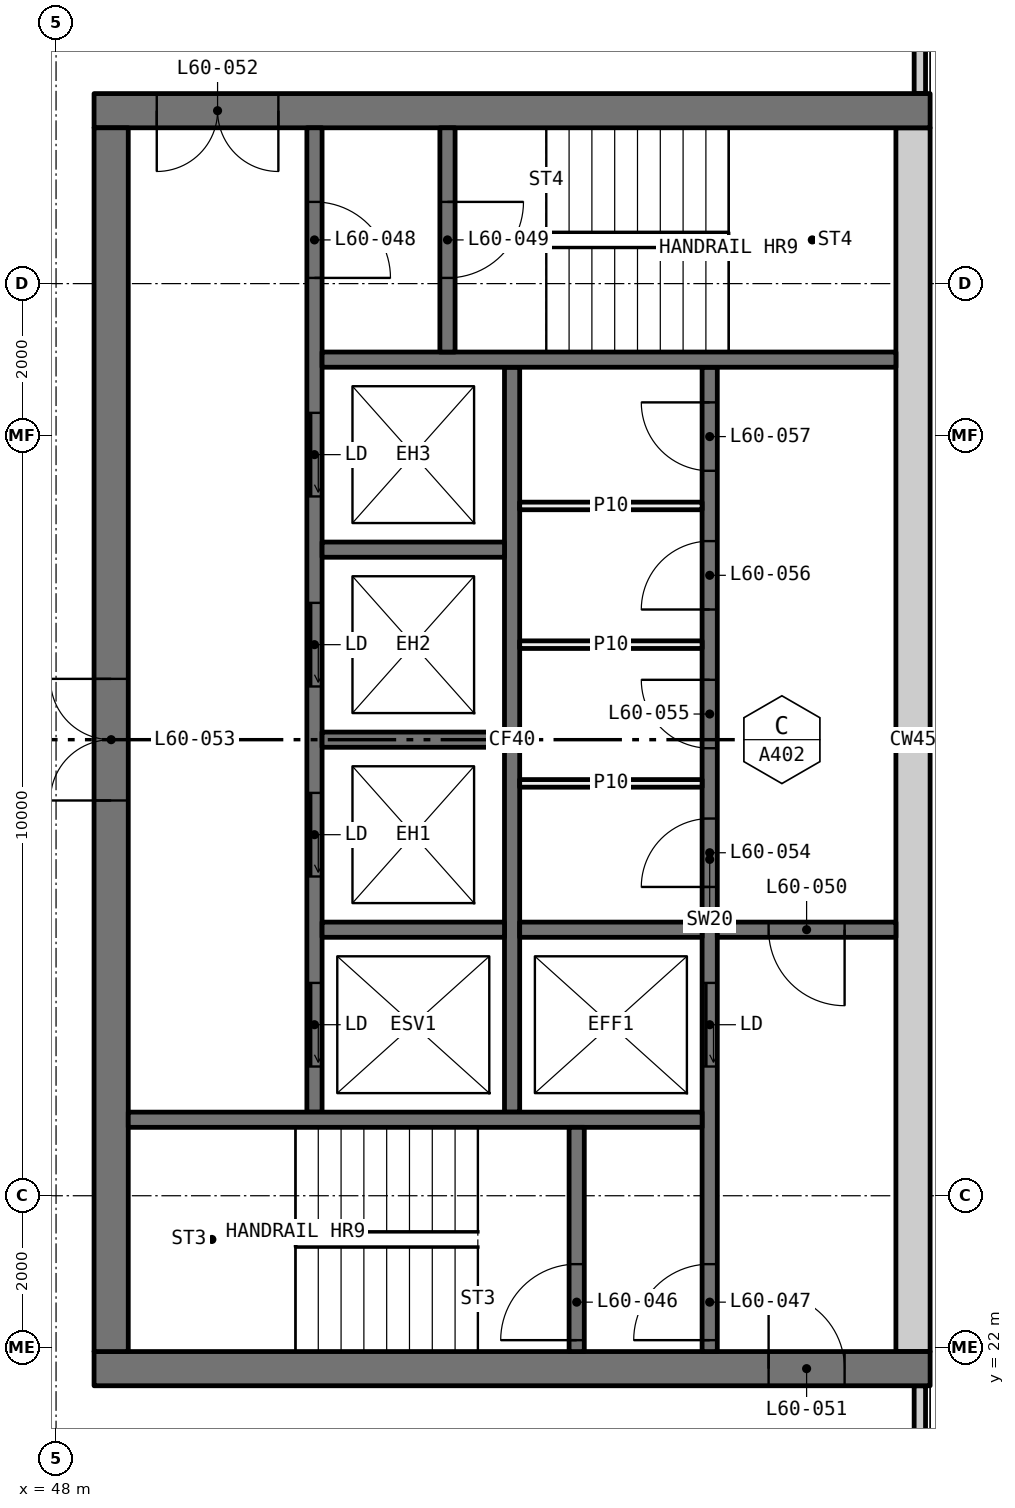
"""IFC4 building model, lengths in metres.
Left out: names, types, materials, properties, quantities, classifications, styles, units other than length and angle.
Written with IfcOpenShell. Run it as: python <this file> out.ifc"""

import sys

from ifc_helpers import new_model, si_unit, direction, frame, frame_2d, origin, place, context, subcontext, project, spatial, rectangle, extrude, element, fill, save


model = new_model("IFC4")
c1 = context("Model", 3, precision=1e-05, world=origin(), true_north=direction((0.0, 1.0)))
c2 = subcontext(c1, "Body", "Model", "MODEL_VIEW")
j1 = project(units=[si_unit("LENGTHUNIT", "METRE"), si_unit("PLANEANGLEUNIT", "RADIAN")], contexts=[c1])
p1 = place(None, origin())
s1 = spatial("IfcSite", under=j1, at=p1, CompositionType="ELEMENT")
p2 = place(p1, origin())
s2 = spatial("IfcBuilding", under=s1, at=p2, CompositionType="ELEMENT")
p3 = place(p2, frame((0.0, 0.0, 224.85)))
s3 = spatial("IfcBuildingStorey", under=s2, at=p3, CompositionType="ELEMENT", Elevation=224.85)
for number, where, z_axis, x_axis in (
    (1, (59.365, 18.71, 0.0), (0.0, 0.0, 1.0), (0.0, 1.0, 0.0)),
    (2, (59.365, 38.5, 0.0), (0.0, 0.0, 1.0), (0.0, 1.0, 0.0)),
):
    element("IfcWall", number, at=place(p3, frame(where, z_axis=z_axis, x_axis=x_axis)), inside=s3, PredefinedType="ELEMENTEDWALL", context=c2, shape_type="SweptSolid", body=[
        extrude(rectangle(XDim=2.79, YDim=0.15, at=frame_2d((1.395, 0.0))), origin(), (0.0, 0.0, 1.0), 3.05),
    ])
p4 = place(p3, frame((59.5, 21.725, 0.0), z_axis=(0.0, 0.0, 1.0), x_axis=(-1.0, 0.0, 0.0)))
e3 = element("IfcWall", 3, at=p4, inside=s3, PredefinedType="SHEAR", context=c2, shape_type="SweptSolid", body=[
    extrude(rectangle(XDim=11.0, YDim=0.45, at=frame_2d((5.5, 0.0))), origin(), (0.0, 0.0, 1.0), 3.05),
])
p5 = place(p4, frame((1.125, 0.0, 0.0)))
e4 = element("IfcOpeningElement", 4, at=p5, cuts=e3, PredefinedType="OPENING", context=c2, shape_type="SweptSolid", body=[
    extrude(rectangle(XDim=1.0, YDim=2.1, at=frame_2d((0.5, 1.05))), frame((0.0, 0.235, 0.0), z_axis=(0.0, -1.0, 0.0), x_axis=(1.0, 0.0, 0.0)), (0.0, 0.0, 1.0), 0.47),
])
p6 = place(p3, frame((59.5, 38.275, 0.0), z_axis=(0.0, 0.0, 1.0), x_axis=(-1.0, 0.0, 0.0)))
e5 = element("IfcWall", 5, at=p6, inside=s3, PredefinedType="SHEAR", context=c2, shape_type="SweptSolid", body=[
    extrude(rectangle(XDim=11.0, YDim=0.45, at=frame_2d((5.5, 0.0))), origin(), (0.0, 0.0, 1.0), 3.05),
])
p7 = place(p6, frame((8.575, 0.0, 0.0)))
e6 = element("IfcOpeningElement", 6, at=p7, cuts=e5, PredefinedType="OPENING", context=c2, shape_type="SweptSolid", body=[
    extrude(rectangle(XDim=1.6, YDim=2.1, at=frame_2d((0.8, 1.05))), frame((0.0, 0.235, 0.0), z_axis=(0.0, -1.0, 0.0), x_axis=(1.0, 0.0, 0.0)), (0.0, 0.0, 1.0), 0.47),
])
p8 = place(p3, frame((59.275, 21.95, 0.0), z_axis=(0.0, 0.0, 1.0), x_axis=(0.0, 1.0, 0.0)))
e7 = element("IfcWall", 7, at=p8, inside=s3, PredefinedType="SHEAR", context=c2, shape_type="SweptSolid", body=[
    extrude(rectangle(XDim=16.1, YDim=0.45, at=frame_2d((8.05, 0.0))), origin(), (0.0, 0.0, 1.0), 3.05),
])
p9 = place(p3, frame((48.725, 21.95, 0.0), z_axis=(0.0, 0.0, 1.0), x_axis=(0.0, 1.0, 0.0)))
e8 = element("IfcWall", 8, at=p9, inside=s3, PredefinedType="SHEAR", context=c2, shape_type="SweptSolid", body=[
    extrude(rectangle(XDim=16.1, YDim=0.45, at=frame_2d((8.05, 0.0))), origin(), (0.0, 0.0, 1.0), 3.05),
])
p10 = place(p9, frame((7.25, 0.0, 0.0)))
e9 = element("IfcOpeningElement", 9, at=p10, cuts=e8, PredefinedType="OPENING", context=c2, shape_type="SweptSolid", body=[
    extrude(rectangle(XDim=1.6, YDim=2.1, at=frame_2d((0.8, 1.05))), frame((0.0, 0.235, 0.0), z_axis=(0.0, -1.0, 0.0), x_axis=(1.0, 0.0, 0.0)), (0.0, 0.0, 1.0), 0.47),
])
p11 = place(p3, frame((56.6, 21.95, 0.0), z_axis=(0.0, 0.0, 1.0), x_axis=(0.0, 1.0, 0.0)))
e10 = element("IfcWall", 10, at=p11, inside=s3, PredefinedType="SOLIDWALL", context=c2, shape_type="SweptSolid", body=[
    extrude(rectangle(XDim=12.95, YDim=0.2, at=frame_2d((6.475, 0.0))), origin(), (0.0, 0.0, 1.0), 3.05),
])
p12 = place(p11, frame((3.75, 0.0, 0.0)))
e11 = element("IfcOpeningElement", 11, at=p12, cuts=e10, PredefinedType="OPENING", context=c2, shape_type="SweptSolid", body=[
    extrude(rectangle(XDim=1.1, YDim=2.1, at=frame_2d((0.55, 1.05))), frame((0.0, 0.11, 0.0), z_axis=(0.0, -1.0, 0.0), x_axis=(1.0, 0.0, 0.0)), (0.0, 0.0, 1.0), 0.22),
])
p13 = place(p11, frame((0.15, 0.0, 0.0)))
e12 = element("IfcOpeningElement", 12, at=p13, cuts=e10, PredefinedType="OPENING", context=c2, shape_type="SweptSolid", body=[
    extrude(rectangle(XDim=1.0, YDim=2.1, at=frame_2d((0.5, 1.05))), frame((0.0, 0.11, 0.0), z_axis=(0.0, -1.0, 0.0), x_axis=(1.0, 0.0, 0.0)), (0.0, 0.0, 1.0), 0.22),
])
p14 = place(p11, frame((6.113, 0.0, 0.0)))
e13 = element("IfcOpeningElement", 13, at=p14, cuts=e10, PredefinedType="OPENING", context=c2, shape_type="SweptSolid", body=[
    extrude(rectangle(XDim=0.9, YDim=2.1, at=frame_2d((0.45, 1.05))), frame((0.0, 0.11, 0.0), z_axis=(0.0, -1.0, 0.0), x_axis=(1.0, 0.0, 0.0)), (0.0, 0.0, 1.0), 0.22),
])
p15 = place(p11, frame((7.938, 0.0, 0.0)))
e14 = element("IfcOpeningElement", 14, at=p15, cuts=e10, PredefinedType="OPENING", context=c2, shape_type="SweptSolid", body=[
    extrude(rectangle(XDim=0.9, YDim=2.1, at=frame_2d((0.45, 1.05))), frame((0.0, 0.11, 0.0), z_axis=(0.0, -1.0, 0.0), x_axis=(1.0, 0.0, 0.0)), (0.0, 0.0, 1.0), 0.22),
])
p16 = place(p11, frame((9.762, 0.0, 0.0)))
e15 = element("IfcOpeningElement", 15, at=p16, cuts=e10, PredefinedType="OPENING", context=c2, shape_type="SweptSolid", body=[
    extrude(rectangle(XDim=0.9, YDim=2.1, at=frame_2d((0.45, 1.05))), frame((0.0, 0.11, 0.0), z_axis=(0.0, -1.0, 0.0), x_axis=(1.0, 0.0, 0.0)), (0.0, 0.0, 1.0), 0.22),
])
p17 = place(p11, frame((11.587, 0.0, 0.0)))
e16 = element("IfcOpeningElement", 16, at=p17, cuts=e10, PredefinedType="OPENING", context=c2, shape_type="SweptSolid", body=[
    extrude(rectangle(XDim=0.9, YDim=2.1, at=frame_2d((0.45, 1.05))), frame((0.0, 0.11, 0.0), z_axis=(0.0, -1.0, 0.0), x_axis=(1.0, 0.0, 0.0)), (0.0, 0.0, 1.0), 0.22),
])
p18 = place(p3, frame((51.4, 25.1, 0.0), z_axis=(0.0, 0.0, 1.0), x_axis=(0.0, 1.0, 0.0)))
e17 = element("IfcWall", 17, at=p18, inside=s3, PredefinedType="SOLIDWALL", context=c2, shape_type="SweptSolid", body=[
    extrude(rectangle(XDim=12.95, YDim=0.2, at=frame_2d((6.475, 0.0))), origin(), (0.0, 0.0, 1.0), 3.05),
])
p19 = place(p18, frame((0.6, 0.0, 0.0)))
e18 = element("IfcOpeningElement", 18, at=p19, cuts=e17, PredefinedType="OPENING", context=c2, shape_type="SweptSolid", body=[
    extrude(rectangle(XDim=1.1, YDim=2.1, at=frame_2d((0.55, 1.05))), frame((0.0, 0.11, 0.0), z_axis=(0.0, -1.0, 0.0), x_axis=(1.0, 0.0, 0.0)), (0.0, 0.0, 1.0), 0.22),
])
p20 = place(p18, frame((3.1, 0.0, 0.0)))
e19 = element("IfcOpeningElement", 19, at=p20, cuts=e17, PredefinedType="OPENING", context=c2, shape_type="SweptSolid", body=[
    extrude(rectangle(XDim=1.1, YDim=2.1, at=frame_2d((0.55, 1.05))), frame((0.0, 0.11, 0.0), z_axis=(0.0, -1.0, 0.0), x_axis=(1.0, 0.0, 0.0)), (0.0, 0.0, 1.0), 0.22),
])
p21 = place(p18, frame((5.6, 0.0, 0.0)))
e20 = element("IfcOpeningElement", 20, at=p21, cuts=e17, PredefinedType="OPENING", context=c2, shape_type="SweptSolid", body=[
    extrude(rectangle(XDim=1.1, YDim=2.1, at=frame_2d((0.55, 1.05))), frame((0.0, 0.11, 0.0), z_axis=(0.0, -1.0, 0.0), x_axis=(1.0, 0.0, 0.0)), (0.0, 0.0, 1.0), 0.22),
])
p22 = place(p18, frame((8.1, 0.0, 0.0)))
e21 = element("IfcOpeningElement", 21, at=p22, cuts=e17, PredefinedType="OPENING", context=c2, shape_type="SweptSolid", body=[
    extrude(rectangle(XDim=1.1, YDim=2.1, at=frame_2d((0.55, 1.05))), frame((0.0, 0.11, 0.0), z_axis=(0.0, -1.0, 0.0), x_axis=(1.0, 0.0, 0.0)), (0.0, 0.0, 1.0), 0.22),
])
p23 = place(p18, frame((10.975, 0.0, 0.0)))
e22 = element("IfcOpeningElement", 22, at=p23, cuts=e17, PredefinedType="OPENING", context=c2, shape_type="SweptSolid", body=[
    extrude(rectangle(XDim=1.0, YDim=2.1, at=frame_2d((0.5, 1.05))), frame((0.0, 0.11, 0.0), z_axis=(0.0, -1.0, 0.0), x_axis=(1.0, 0.0, 0.0)), (0.0, 0.0, 1.0), 0.22),
])
p24 = place(p3, frame((54.0, 25.1, 0.0), z_axis=(0.0, 0.0, 1.0), x_axis=(0.0, 1.0, 0.0)))
e23 = element("IfcWall", 23, at=p24, inside=s3, PredefinedType="SOLIDWALL", context=c2, shape_type="SweptSolid", body=[
    extrude(rectangle(XDim=9.8, YDim=0.2, at=frame_2d((4.9, 0.0))), origin(), (0.0, 0.0, 1.0), 3.05),
])
for number, where, z_axis, x_axis in (
    (24, (56.5, 25.0, 0.0), (0.0, 0.0, 1.0), (-1.0, 0.0, 0.0)),
    (25, (59.05, 35.0, 0.0), (0.0, 0.0, 1.0), (-1.0, 0.0, 0.0)),
):
    element("IfcWall", number, at=place(p3, frame(where, z_axis=z_axis, x_axis=x_axis)), inside=s3, PredefinedType="SOLIDWALL", context=c2, shape_type="SweptSolid", body=[
        extrude(rectangle(XDim=7.55, YDim=0.2, at=frame_2d((3.775, 0.0))), origin(), (0.0, 0.0, 1.0), 3.05),
    ])
p25 = place(p3, frame((59.05, 27.5, 0.0), z_axis=(0.0, 0.0, 1.0), x_axis=(-1.0, 0.0, 0.0)))
e26 = element("IfcWall", 26, at=p25, inside=s3, PredefinedType="SOLIDWALL", context=c2, shape_type="SweptSolid", body=[
    extrude(rectangle(XDim=2.35, YDim=0.2, at=frame_2d((1.175, 0.0))), origin(), (0.0, 0.0, 1.0), 3.05),
])
p26 = place(p25, frame((0.675, 0.0, 0.0)))
e27 = element("IfcOpeningElement", 27, at=p26, cuts=e26, PredefinedType="OPENING", context=c2, shape_type="SweptSolid", body=[
    extrude(rectangle(XDim=1.0, YDim=2.1, at=frame_2d((0.5, 1.05))), frame((0.0, 0.11, 0.0), z_axis=(0.0, -1.0, 0.0), x_axis=(1.0, 0.0, 0.0)), (0.0, 0.0, 1.0), 0.22),
])
p27 = place(p3, frame((54.85, 21.95, 0.0), z_axis=(0.0, 0.0, 1.0), x_axis=(0.0, 1.0, 0.0)))
e28 = element("IfcWall", 28, at=p27, inside=s3, PredefinedType="SOLIDWALL", context=c2, shape_type="SweptSolid", body=[
    extrude(rectangle(XDim=2.95, YDim=0.2, at=frame_2d((1.475, 0.0))), origin(), (0.0, 0.0, 1.0), 3.05),
])
p28 = place(p27, frame((0.15, 0.0, 0.0)))
e29 = element("IfcOpeningElement", 29, at=p28, cuts=e28, PredefinedType="OPENING", context=c2, shape_type="SweptSolid", body=[
    extrude(rectangle(XDim=1.0, YDim=2.1, at=frame_2d((0.5, 1.05))), frame((0.0, 0.11, 0.0), z_axis=(0.0, -1.0, 0.0), x_axis=(1.0, 0.0, 0.0)), (0.0, 0.0, 1.0), 0.22),
])
p29 = place(p3, frame((53.15, 35.1, 0.0), z_axis=(0.0, 0.0, 1.0), x_axis=(0.0, 1.0, 0.0)))
e30 = element("IfcWall", 30, at=p29, inside=s3, PredefinedType="SOLIDWALL", context=c2, shape_type="SweptSolid", body=[
    extrude(rectangle(XDim=2.95, YDim=0.2, at=frame_2d((1.475, 0.0))), origin(), (0.0, 0.0, 1.0), 3.05),
])
p30 = place(p29, frame((0.975, 0.0, 0.0)))
e31 = element("IfcOpeningElement", 31, at=p30, cuts=e30, PredefinedType="OPENING", context=c2, shape_type="SweptSolid", body=[
    extrude(rectangle(XDim=1.0, YDim=2.1, at=frame_2d((0.5, 1.05))), frame((0.0, 0.11, 0.0), z_axis=(0.0, -1.0, 0.0), x_axis=(1.0, 0.0, 0.0)), (0.0, 0.0, 1.0), 0.22),
])
for number, where, z_axis, x_axis in (
    (32, (56.5, 27.5, 0.0), (0.0, 0.0, 1.0), (-1.0, 0.0, 0.0)),
    (33, (53.9, 27.5, 0.0), (0.0, 0.0, 1.0), (-1.0, 0.0, 0.0)),
    (34, (53.9, 30.0, 0.0), (0.0, 0.0, 1.0), (-1.0, 0.0, 0.0)),
    (35, (53.9, 32.5, 0.0), (0.0, 0.0, 1.0), (-1.0, 0.0, 0.0)),
):
    element("IfcWall", number, at=place(p3, frame(where, z_axis=z_axis, x_axis=x_axis)), inside=s3, PredefinedType="SOLIDWALL", context=c2, shape_type="SweptSolid", body=[
        extrude(rectangle(XDim=2.4, YDim=0.2, at=frame_2d((1.2, 0.0))), origin(), (0.0, 0.0, 1.0), 3.05),
    ])
for number, where, z_axis, x_axis in (
    (36, (56.5, 29.425, 0.0), (0.0, 0.0, 1.0), (-1.0, 0.0, 0.0)),
    (37, (56.5, 31.25, 0.0), (0.0, 0.0, 1.0), (-1.0, 0.0, 0.0)),
    (38, (56.5, 33.075, 0.0), (0.0, 0.0, 1.0), (-1.0, 0.0, 0.0)),
):
    element("IfcWall", number, at=place(p3, frame(where, z_axis=z_axis, x_axis=x_axis)), inside=s3, PredefinedType="PARTITIONING", context=c2, shape_type="SweptSolid", body=[
        extrude(rectangle(XDim=2.4, YDim=0.1, at=frame_2d((1.2, 0.0))), origin(), (0.0, 0.0, 1.0), 3.05),
    ])
p31 = place(p19, origin())
e39 = element("IfcDoor", 39, at=p31, inside=s3, OperationType="SLIDING_TO_LEFT", PredefinedType="DOOR", context=c2, shape_type="SweptSolid", body=[
    extrude(rectangle(XDim=1.1, YDim=2.1, at=frame_2d((0.55, 1.05))), frame((0.0, 0.025, 0.0), z_axis=(0.0, -1.0, 0.0), x_axis=(1.0, 0.0, 0.0)), (0.0, 0.0, 1.0), 0.05),
])
fill(e18, e39)
p32 = place(p20, origin())
e40 = element("IfcDoor", 40, at=p32, inside=s3, OperationType="SLIDING_TO_LEFT", PredefinedType="DOOR", context=c2, shape_type="SweptSolid", body=[
    extrude(rectangle(XDim=1.1, YDim=2.1, at=frame_2d((0.55, 1.05))), frame((0.0, 0.025, 0.0), z_axis=(0.0, -1.0, 0.0), x_axis=(1.0, 0.0, 0.0)), (0.0, 0.0, 1.0), 0.05),
])
fill(e19, e40)
p33 = place(p21, origin())
e41 = element("IfcDoor", 41, at=p33, inside=s3, OperationType="SLIDING_TO_LEFT", PredefinedType="DOOR", context=c2, shape_type="SweptSolid", body=[
    extrude(rectangle(XDim=1.1, YDim=2.1, at=frame_2d((0.55, 1.05))), frame((0.0, 0.025, 0.0), z_axis=(0.0, -1.0, 0.0), x_axis=(1.0, 0.0, 0.0)), (0.0, 0.0, 1.0), 0.05),
])
fill(e20, e41)
p34 = place(p22, origin())
e42 = element("IfcDoor", 42, at=p34, inside=s3, OperationType="SLIDING_TO_LEFT", PredefinedType="DOOR", context=c2, shape_type="SweptSolid", body=[
    extrude(rectangle(XDim=1.1, YDim=2.1, at=frame_2d((0.55, 1.05))), frame((0.0, 0.025, 0.0), z_axis=(0.0, -1.0, 0.0), x_axis=(1.0, 0.0, 0.0)), (0.0, 0.0, 1.0), 0.05),
])
fill(e21, e42)
p35 = place(p12, origin())
e43 = element("IfcDoor", 43, at=p35, inside=s3, OperationType="SLIDING_TO_LEFT", PredefinedType="DOOR", context=c2, shape_type="SweptSolid", body=[
    extrude(rectangle(XDim=1.1, YDim=2.1, at=frame_2d((0.55, 1.05))), frame((0.0, 0.025, 0.0), z_axis=(0.0, -1.0, 0.0), x_axis=(1.0, 0.0, 0.0)), (0.0, 0.0, 1.0), 0.05),
])
fill(e11, e43)
p36 = place(p28, origin())
e44 = element("IfcDoor", 44, at=p36, inside=s3, OperationType="SINGLE_SWING_RIGHT", PredefinedType="DOOR", context=c2, shape_type="SweptSolid", body=[
    extrude(rectangle(XDim=1.0, YDim=2.1, at=frame_2d((0.5, 1.05))), frame((0.0, 0.025, 0.0), z_axis=(0.0, -1.0, 0.0), x_axis=(1.0, 0.0, 0.0)), (0.0, 0.0, 1.0), 0.05),
])
fill(e29, e44)
p37 = place(p13, origin())
e45 = element("IfcDoor", 45, at=p37, inside=s3, OperationType="SINGLE_SWING_RIGHT", PredefinedType="DOOR", context=c2, shape_type="SweptSolid", body=[
    extrude(rectangle(XDim=1.0, YDim=2.1, at=frame_2d((0.5, 1.05))), frame((0.0, 0.025, 0.0), z_axis=(0.0, -1.0, 0.0), x_axis=(1.0, 0.0, 0.0)), (0.0, 0.0, 1.0), 0.05),
])
fill(e12, e45)
p38 = place(p23, frame((1.0, 0.0, 0.0), x_axis=(-1.0, 0.0, 0.0)))
e46 = element("IfcDoor", 46, at=p38, inside=s3, OperationType="SINGLE_SWING_LEFT", PredefinedType="DOOR", context=c2, shape_type="SweptSolid", body=[
    extrude(rectangle(XDim=1.0, YDim=2.1, at=frame_2d((0.5, 1.05))), frame((0.0, 0.025, 0.0), z_axis=(0.0, -1.0, 0.0), x_axis=(1.0, 0.0, 0.0)), (0.0, 0.0, 1.0), 0.05),
])
fill(e22, e46)
p39 = place(p30, frame((1.0, 0.0, 0.0), x_axis=(-1.0, 0.0, 0.0)))
e47 = element("IfcDoor", 47, at=p39, inside=s3, OperationType="SINGLE_SWING_RIGHT", PredefinedType="DOOR", context=c2, shape_type="SweptSolid", body=[
    extrude(rectangle(XDim=1.0, YDim=2.1, at=frame_2d((0.5, 1.05))), frame((0.0, 0.025, 0.0), z_axis=(0.0, -1.0, 0.0), x_axis=(1.0, 0.0, 0.0)), (0.0, 0.0, 1.0), 0.05),
])
fill(e31, e47)
p40 = place(p26, origin())
e48 = element("IfcDoor", 48, at=p40, inside=s3, OperationType="SINGLE_SWING_RIGHT", PredefinedType="DOOR", context=c2, shape_type="SweptSolid", body=[
    extrude(rectangle(XDim=1.0, YDim=2.1, at=frame_2d((0.5, 1.05))), frame((0.0, 0.025, 0.0), z_axis=(0.0, -1.0, 0.0), x_axis=(1.0, 0.0, 0.0)), (0.0, 0.0, 1.0), 0.05),
])
fill(e27, e48)
p41 = place(p5, frame((1.0, 0.0, 0.0), x_axis=(-1.0, 0.0, 0.0)))
e49 = element("IfcDoor", 49, at=p41, inside=s3, OperationType="SINGLE_SWING_RIGHT", PredefinedType="DOOR", context=c2, shape_type="SweptSolid", body=[
    extrude(rectangle(XDim=1.0, YDim=2.1, at=frame_2d((0.5, 1.05))), frame((0.0, 0.025, 0.0), z_axis=(0.0, -1.0, 0.0), x_axis=(1.0, 0.0, 0.0)), (0.0, 0.0, 1.0), 0.05),
])
fill(e4, e49)
p42 = place(p7, origin())
e50 = element("IfcDoor", 50, at=p42, inside=s3, OperationType="DOUBLE_DOOR_SINGLE_SWING", PredefinedType="DOOR", context=c2, shape_type="SweptSolid", body=[
    extrude(rectangle(XDim=1.6, YDim=2.1, at=frame_2d((0.8, 1.05))), frame((0.0, 0.025, 0.0), z_axis=(0.0, -1.0, 0.0), x_axis=(1.0, 0.0, 0.0)), (0.0, 0.0, 1.0), 0.05),
])
fill(e6, e50)
p43 = place(p10, origin())
e51 = element("IfcDoor", 51, at=p43, inside=s3, OperationType="DOUBLE_DOOR_SINGLE_SWING", PredefinedType="DOOR", context=c2, shape_type="SweptSolid", body=[
    extrude(rectangle(XDim=1.6, YDim=2.1, at=frame_2d((0.8, 1.05))), frame((0.0, 0.025, 0.0), z_axis=(0.0, -1.0, 0.0), x_axis=(1.0, 0.0, 0.0)), (0.0, 0.0, 1.0), 0.05),
])
fill(e9, e51)
p44 = place(p14, origin())
e52 = element("IfcDoor", 52, at=p44, inside=s3, OperationType="SINGLE_SWING_RIGHT", PredefinedType="DOOR", context=c2, shape_type="SweptSolid", body=[
    extrude(rectangle(XDim=0.9, YDim=2.1, at=frame_2d((0.45, 1.05))), frame((0.0, 0.025, 0.0), z_axis=(0.0, -1.0, 0.0), x_axis=(1.0, 0.0, 0.0)), (0.0, 0.0, 1.0), 0.05),
])
fill(e13, e52)
p45 = place(p15, origin())
e53 = element("IfcDoor", 53, at=p45, inside=s3, OperationType="SINGLE_SWING_LEFT", PredefinedType="DOOR", context=c2, shape_type="SweptSolid", body=[
    extrude(rectangle(XDim=0.9, YDim=2.1, at=frame_2d((0.45, 1.05))), frame((0.0, 0.025, 0.0), z_axis=(0.0, -1.0, 0.0), x_axis=(1.0, 0.0, 0.0)), (0.0, 0.0, 1.0), 0.05),
])
fill(e14, e53)
p46 = place(p16, origin())
e54 = element("IfcDoor", 54, at=p46, inside=s3, OperationType="SINGLE_SWING_RIGHT", PredefinedType="DOOR", context=c2, shape_type="SweptSolid", body=[
    extrude(rectangle(XDim=0.9, YDim=2.1, at=frame_2d((0.45, 1.05))), frame((0.0, 0.025, 0.0), z_axis=(0.0, -1.0, 0.0), x_axis=(1.0, 0.0, 0.0)), (0.0, 0.0, 1.0), 0.05),
])
fill(e15, e54)
p47 = place(p17, origin())
e55 = element("IfcDoor", 55, at=p47, inside=s3, OperationType="SINGLE_SWING_LEFT", PredefinedType="DOOR", context=c2, shape_type="SweptSolid", body=[
    extrude(rectangle(XDim=0.9, YDim=2.1, at=frame_2d((0.45, 1.05))), frame((0.0, 0.025, 0.0), z_axis=(0.0, -1.0, 0.0), x_axis=(1.0, 0.0, 0.0)), (0.0, 0.0, 1.0), 0.05),
])
fill(e16, e55)
save(model, sys.argv[1])
